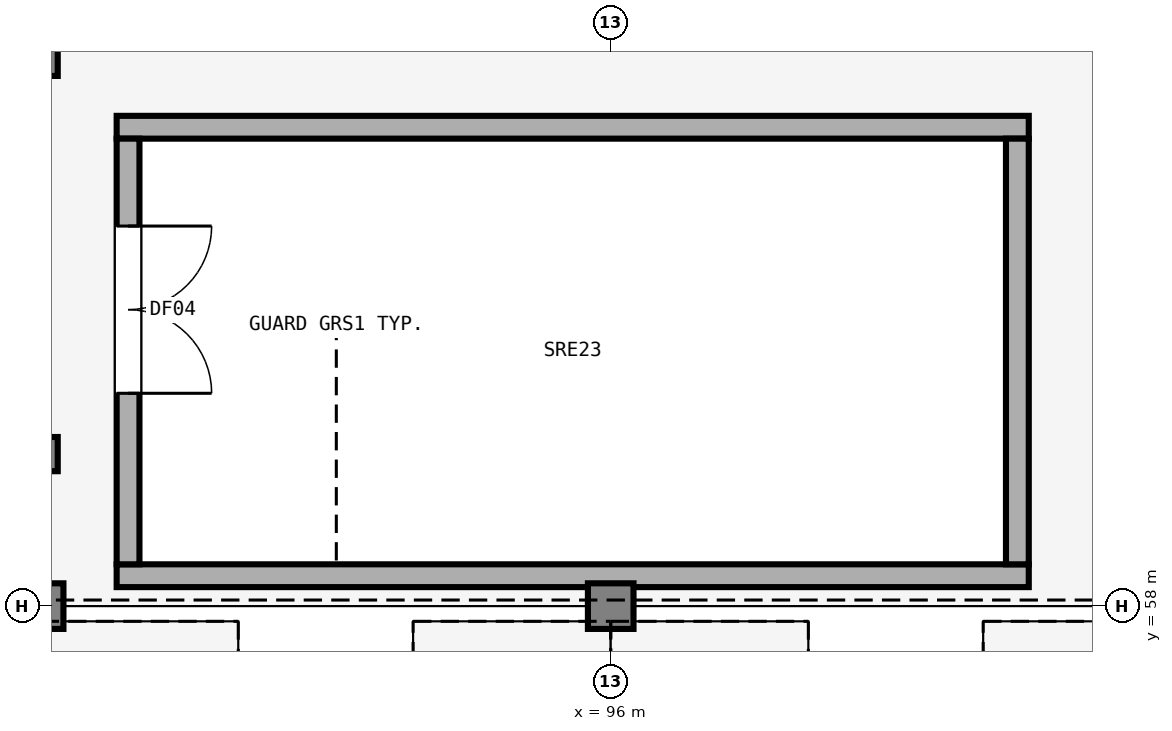
"""IFC4 building model, lengths in metres.
Left out: names, types, materials, properties, quantities, classifications, styles, units other than length and angle.
Written with IfcOpenShell. Run it as: python <this file> out.ifc"""

import sys

from ifc_helpers import new_model, si_unit, direction, frame, frame_2d, origin, origin_2d, place, context, subcontext, project, spatial, rectangle, extrude, element, fill, save


model = new_model("IFC4")
c1 = context("Model", 3, precision=1e-05, world=origin(), true_north=direction((0.0, 1.0)))
c2 = subcontext(c1, "Body", "Model", "MODEL_VIEW")
j1 = project(units=[si_unit("LENGTHUNIT", "METRE"), si_unit("PLANEANGLEUNIT", "RADIAN")], contexts=[c1])
p1 = place(None, origin())
s1 = spatial("IfcSite", under=j1, at=p1, CompositionType="ELEMENT")
p2 = place(p1, origin())
s2 = spatial("IfcBuilding", under=s1, at=p2, CompositionType="ELEMENT")
p3 = place(p2, frame((0.0, 0.0, 4.8)))
s3 = spatial("IfcBuildingStorey", under=s2, at=p3, CompositionType="ELEMENT", Elevation=4.8)
for number, where, z_axis, x_axis in (
    (1, (88.5, 58.0, 0.0), (0.0, 0.0, 1.0), (1.0, 0.0, 0.0)),
    (2, (96.0, 58.0, 0.0), (0.0, 0.0, 1.0), (1.0, 0.0, 0.0)),
):
    element("IfcColumn", number, at=place(p3, frame(where, z_axis=z_axis, x_axis=x_axis)), inside=s3, PredefinedType="COLUMN", context=c2, shape_type="SweptSolid", body=[
        extrude(rectangle(XDim=0.6, YDim=0.6, at=origin_2d()), origin(), (0.0, 0.0, 1.0), 4.5),
    ])
for number, where, z_axis, x_axis in (
    (3, (88.5, 60.0, 0.0), (0.0, 0.0, 1.0), (1.0, 0.0, 0.0)),
    (4, (88.5, 65.2, 0.0), (0.0, 0.0, 1.0), (1.0, 0.0, 0.0)),
):
    element("IfcColumn", number, at=place(p3, frame(where, z_axis=z_axis, x_axis=x_axis)), inside=s3, PredefinedType="COLUMN", context=c2, shape_type="SweptSolid", body=[
        extrude(rectangle(XDim=0.45, YDim=0.45, at=origin_2d()), origin(), (0.0, 0.0, 1.0), 2.805),
    ])
for number, where, z_axis, x_axis in (
    (5, (89.5, 58.4, 0.0), (0.0, 0.0, 1.0), (1.0, 0.0, 0.0)),
    (6, (101.5, 64.3, 0.0), (0.0, 0.0, 1.0), (-1.0, 0.0, 0.0)),
):
    element("IfcWall", number, at=place(p3, frame(where, z_axis=z_axis, x_axis=x_axis)), inside=s3, PredefinedType="SHEAR", context=c2, shape_type="SweptSolid", body=[
        extrude(rectangle(XDim=12.0, YDim=0.3, at=frame_2d((6.0, 0.0))), origin(), (0.0, 0.0, 1.0), 3.4),
    ])
p4 = place(p3, frame((89.65, 64.15, 0.0), z_axis=(0.0, 0.0, 1.0), x_axis=(0.0, -1.0, 0.0)))
e7 = element("IfcWall", 7, at=p4, inside=s3, PredefinedType="SHEAR", context=c2, shape_type="SweptSolid", body=[
    extrude(rectangle(XDim=5.6, YDim=0.3, at=frame_2d((2.8, 0.0))), origin(), (0.0, 0.0, 1.0), 3.4),
])
p5 = place(p4, frame((1.15, 0.0, 0.0)))
e8 = element("IfcOpeningElement", 8, at=p5, cuts=e7, PredefinedType="OPENING", context=c2, shape_type="SweptSolid", body=[
    extrude(rectangle(XDim=2.2, YDim=2.25, at=frame_2d((1.1, 1.125))), frame((0.0, 0.16, 0.0), z_axis=(0.0, -1.0, 0.0), x_axis=(1.0, 0.0, 0.0)), (0.0, 0.0, 1.0), 0.32),
])
p6 = place(p3, frame((101.35, 58.55, 0.0), z_axis=(0.0, 0.0, 1.0), x_axis=(0.0, 1.0, 0.0)))
e9 = element("IfcWall", 9, at=p6, inside=s3, PredefinedType="SHEAR", context=c2, shape_type="SweptSolid", body=[
    extrude(rectangle(XDim=5.6, YDim=0.3, at=frame_2d((2.8, 0.0))), origin(), (0.0, 0.0, 1.0), 3.4),
])
p7 = place(p5, origin())
e10 = element("IfcDoor", 10, at=p7, inside=s3, OperationType="DOUBLE_DOOR_SINGLE_SWING", PredefinedType="DOOR", context=c2, shape_type="SweptSolid", body=[
    extrude(rectangle(XDim=2.2, YDim=2.25, at=frame_2d((1.1, 1.125))), frame((0.0, 0.025, 0.0), z_axis=(0.0, -1.0, 0.0), x_axis=(1.0, 0.0, 0.0)), (0.0, 0.0, 1.0), 0.05),
])
fill(e8, e10)
save(model, sys.argv[1])
